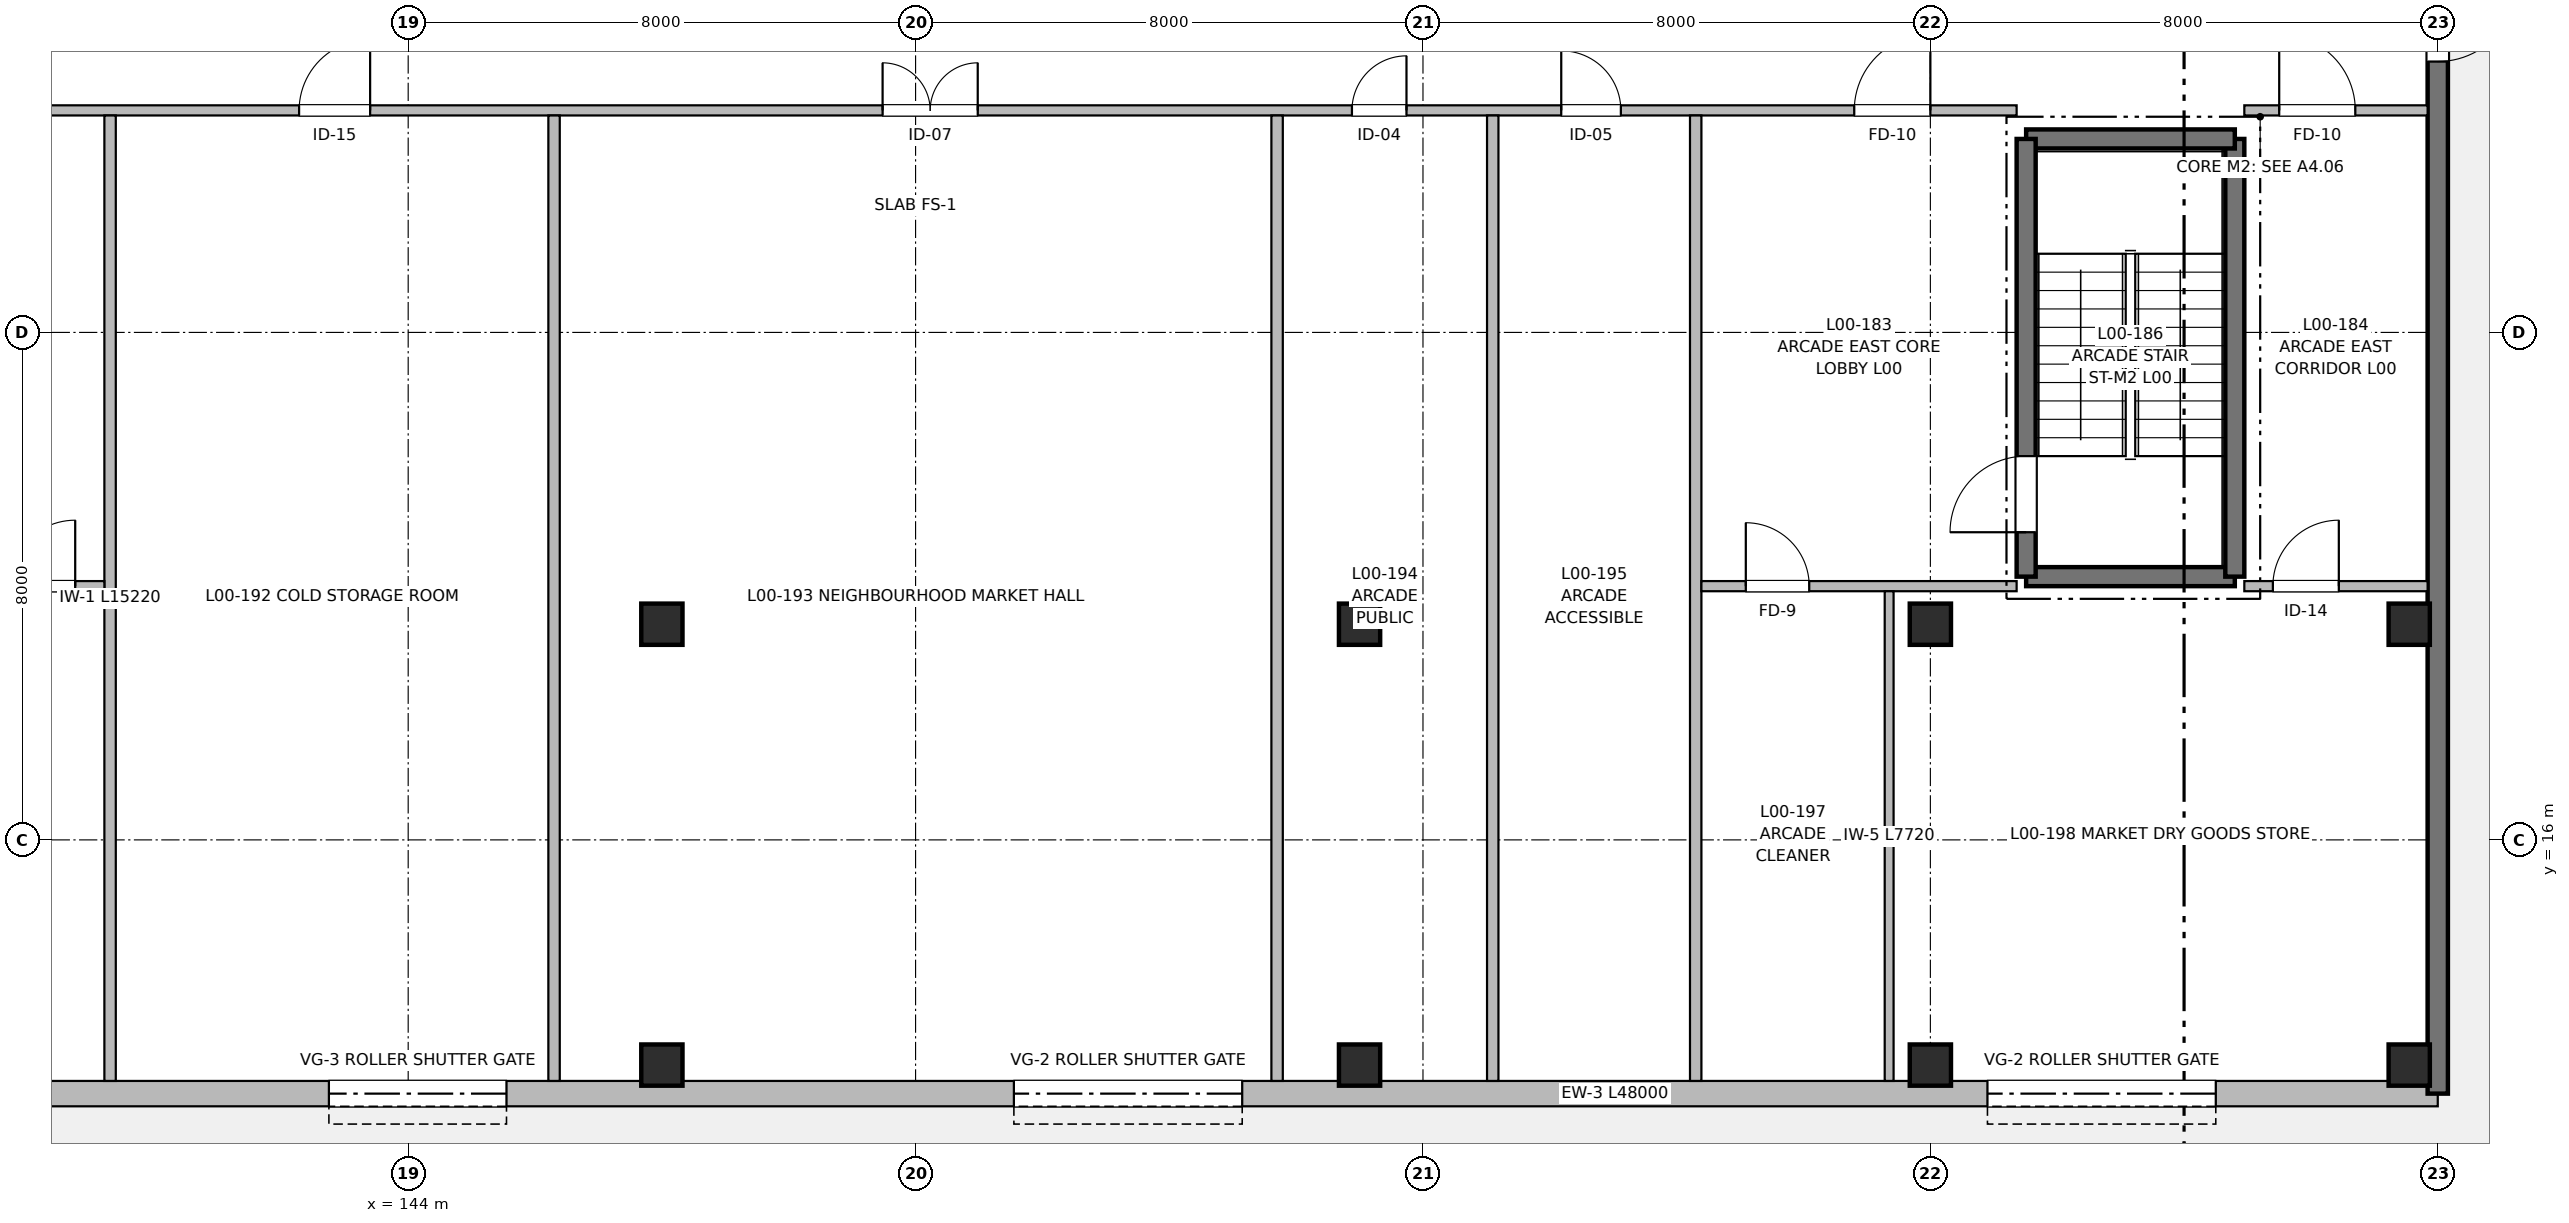
"""IFC4 building model, lengths in metres.
Left out: names, types, materials, properties, quantities, classifications, styles, units other than length and angle.
Written with IfcOpenShell. Run it as: python <this file> out.ifc"""

import sys

from ifc_helpers import new_model, si_unit, direction, frame, frame_2d, origin, origin_2d, place, context, subcontext, project, spatial, rectangle, extrude, element, fill, save


model = new_model("IFC4")
c1 = context("Model", 3, precision=1e-05, world=origin(), true_north=direction((0.0, 1.0)))
c2 = subcontext(c1, "Body", "Model", "MODEL_VIEW")
j1 = project(units=[si_unit("LENGTHUNIT", "METRE"), si_unit("PLANEANGLEUNIT", "RADIAN")], contexts=[c1])
p1 = place(None, origin())
s1 = spatial("IfcSite", under=j1, at=p1, CompositionType="ELEMENT")
p2 = place(p1, origin())
s2 = spatial("IfcBuilding", under=s1, at=p2, CompositionType="ELEMENT")
p3 = place(p2, origin())
s3 = spatial("IfcBuildingStorey", under=s2, at=p3, CompositionType="ELEMENT", Elevation=0.0)
for number, where, z_axis, x_axis in (
    (1, (148.0, 12.45, 0.0), (0.0, 0.0, 1.0), (1.0, 0.0, 0.0)),
    (2, (148.0, 19.4, 0.0), (0.0, 0.0, 1.0), (1.0, 0.0, 0.0)),
    (3, (159.0, 12.45, 0.0), (0.0, 0.0, 1.0), (1.0, 0.0, 0.0)),
    (4, (159.0, 19.4, 0.0), (0.0, 0.0, 1.0), (1.0, 0.0, 0.0)),
    (5, (168.0, 12.45, 0.0), (0.0, 0.0, 1.0), (1.0, 0.0, 0.0)),
    (6, (168.0, 19.4, 0.0), (0.0, 0.0, 1.0), (1.0, 0.0, 0.0)),
    (7, (175.55, 12.45, 0.0), (0.0, 0.0, 1.0), (1.0, 0.0, 0.0)),
    (8, (175.55, 19.4, 0.0), (0.0, 0.0, 1.0), (1.0, 0.0, 0.0)),
):
    element("IfcColumn", number, at=place(p3, frame(where, z_axis=z_axis, x_axis=x_axis)), inside=s3, PredefinedType="COLUMN", context=c2, shape_type="SweptSolid", body=[
        extrude(rectangle(XDim=0.65, YDim=0.65, at=origin_2d()), origin(), (0.0, 0.0, 1.0), 4.16),
    ])
p4 = place(p3, frame((176.0, 12.0, 0.0), z_axis=(0.0, 0.0, 1.0), x_axis=(-1.0, 0.0, 0.0)))
e9 = element("IfcWall", 9, at=p4, inside=s3, PredefinedType="SOLIDWALL", context=c2, shape_type="SweptSolid", body=[
    extrude(rectangle(XDim=48.0, YDim=0.4, at=frame_2d((24.0, 0.0))), origin(), (0.0, 0.0, 1.0), 3.9),
])
p5 = place(p4, frame((3.5, 0.0, 0.0)))
e10 = element("IfcOpeningElement", 10, at=p5, cuts=e9, PredefinedType="OPENING", context=c2, shape_type="SweptSolid", body=[
    extrude(rectangle(XDim=3.6, YDim=2.8, at=frame_2d((1.8, 1.4))), frame((0.0, 0.21, 0.0), z_axis=(0.0, -1.0, 0.0), x_axis=(1.0, 0.0, 0.0)), (0.0, 0.0, 1.0), 0.42),
])
p6 = place(p4, frame((18.85, 0.0, 0.0)))
e11 = element("IfcOpeningElement", 11, at=p6, cuts=e9, PredefinedType="OPENING", context=c2, shape_type="SweptSolid", body=[
    extrude(rectangle(XDim=3.6, YDim=2.8, at=frame_2d((1.8, 1.4))), frame((0.0, 0.21, 0.0), z_axis=(0.0, -1.0, 0.0), x_axis=(1.0, 0.0, 0.0)), (0.0, 0.0, 1.0), 0.42),
])
p7 = place(p4, frame((30.45, 0.0, 0.0)))
e12 = element("IfcOpeningElement", 12, at=p7, cuts=e9, PredefinedType="OPENING", context=c2, shape_type="SweptSolid", body=[
    extrude(rectangle(XDim=2.8, YDim=2.5, at=frame_2d((1.4, 1.25))), frame((0.0, 0.21, 0.0), z_axis=(0.0, -1.0, 0.0), x_axis=(1.0, 0.0, 0.0)), (0.0, 0.0, 1.0), 0.42),
])
p8 = place(p4, frame((39.8, 0.0, 0.0)))
e13 = element("IfcOpeningElement", 13, at=p8, cuts=e9, PredefinedType="OPENING", context=c2, shape_type="SweptSolid", body=[
    extrude(rectangle(XDim=2.8, YDim=2.5, at=frame_2d((1.4, 1.25))), frame((0.0, 0.21, 0.0), z_axis=(0.0, -1.0, 0.0), x_axis=(1.0, 0.0, 0.0)), (0.0, 0.0, 1.0), 0.42),
])
p9 = place(p3, frame((176.0, 40.0, 0.0), z_axis=(0.0, 0.0, 1.0), x_axis=(0.0, -1.0, 0.0)))
e14 = element("IfcWall", 14, at=p9, inside=s3, PredefinedType="SHEAR", context=c2, shape_type="SweptSolid", body=[
    extrude(rectangle(XDim=28.0, YDim=0.32, at=frame_2d((14.0, 0.0))), origin(), (0.0, 0.0, 1.0), 3.9),
])
p10 = place(p9, frame((10.48, 0.0, 0.0)))
e15 = element("IfcOpeningElement", 15, at=p10, cuts=e14, PredefinedType="OPENING", context=c2, shape_type="SweptSolid", body=[
    extrude(rectangle(XDim=1.25, YDim=2.2, at=frame_2d((0.625, 1.1))), frame((0.0, 0.17, 0.0), z_axis=(0.0, -1.0, 0.0), x_axis=(1.0, 0.0, 0.0)), (0.0, 0.0, 1.0), 0.34),
])
p11 = place(p3, frame((172.8, 20.15, 0.0), z_axis=(0.0, 0.0, 1.0), x_axis=(-1.0, 0.0, 0.0)))
e16 = element("IfcWall", 16, at=p11, inside=s3, PredefinedType="SHEAR", context=c2, shape_type="SweptSolid", body=[
    extrude(rectangle(XDim=3.29, YDim=0.3, at=frame_2d((1.645, 0.0))), origin(), (0.0, 0.0, 1.0), 4.16),
])
p12 = place(p3, frame((172.8, 27.05, 0.0), z_axis=(0.0, 0.0, 1.0), x_axis=(0.0, -1.0, 0.0)))
e17 = element("IfcWall", 17, at=p12, inside=s3, PredefinedType="SHEAR", context=c2, shape_type="SweptSolid", body=[
    extrude(rectangle(XDim=6.9, YDim=0.3, at=frame_2d((3.45, 0.0))), origin(), (0.0, 0.0, 1.0), 4.16),
])
p13 = place(p3, frame((169.51, 27.05, 0.0), z_axis=(0.0, 0.0, 1.0), x_axis=(1.0, 0.0, 0.0)))
e18 = element("IfcWall", 18, at=p13, inside=s3, PredefinedType="SHEAR", context=c2, shape_type="SweptSolid", body=[
    extrude(rectangle(XDim=3.29, YDim=0.3, at=frame_2d((1.645, 0.0))), origin(), (0.0, 0.0, 1.0), 4.16),
])
p14 = place(p3, frame((169.51, 20.15, 0.0), z_axis=(0.0, 0.0, 1.0), x_axis=(0.0, 1.0, 0.0)))
e19 = element("IfcWall", 19, at=p14, inside=s3, PredefinedType="SHEAR", context=c2, shape_type="SweptSolid", body=[
    extrude(rectangle(XDim=6.9, YDim=0.3, at=frame_2d((3.45, 0.0))), origin(), (0.0, 0.0, 1.0), 4.16),
])
p15 = place(p14, frame((0.7, 0.0, 0.0)))
e20 = element("IfcOpeningElement", 20, at=p15, cuts=e19, PredefinedType="OPENING", context=c2, shape_type="SweptSolid", body=[
    extrude(rectangle(XDim=1.2, YDim=2.2, at=frame_2d((0.6, 1.1))), frame((0.0, 0.16, 0.0), z_axis=(0.0, -1.0, 0.0), x_axis=(1.0, 0.0, 0.0)), (0.0, 0.0, 1.0), 0.32),
])
p16 = place(p3, frame((133.35, 27.5, 0.0), z_axis=(0.0, 0.0, 1.0), x_axis=(1.0, 0.0, 0.0)))
e21 = element("IfcWall", 21, at=p16, inside=s3, PredefinedType="PARTITIONING", context=c2, shape_type="SweptSolid", body=[
    extrude(rectangle(XDim=36.01, YDim=0.16, at=frame_2d((18.005, 0.0))), origin(), (0.0, 0.0, 1.0), 3.89),
])
p17 = place(p16, frame((2.15, 0.0, 0.0)))
e22 = element("IfcOpeningElement", 22, at=p17, cuts=e21, PredefinedType="OPENING", context=c2, shape_type="SweptSolid", body=[
    extrude(rectangle(XDim=1.2, YDim=2.2, at=frame_2d((0.6, 1.1))), frame((0.0, 0.09, 0.0), z_axis=(0.0, -1.0, 0.0), x_axis=(1.0, 0.0, 0.0)), (0.0, 0.0, 1.0), 0.18),
])
p18 = place(p16, frame((33.45, 0.0, 0.0)))
e23 = element("IfcOpeningElement", 23, at=p18, cuts=e21, PredefinedType="OPENING", context=c2, shape_type="SweptSolid", body=[
    extrude(rectangle(XDim=1.2, YDim=2.2, at=frame_2d((0.6, 1.1))), frame((0.0, 0.09, 0.0), z_axis=(0.0, -1.0, 0.0), x_axis=(1.0, 0.0, 0.0)), (0.0, 0.0, 1.0), 0.18),
])
p19 = place(p16, frame((8.93, 0.0, 0.0)))
e24 = element("IfcOpeningElement", 24, at=p19, cuts=e21, PredefinedType="OPENING", context=c2, shape_type="SweptSolid", body=[
    extrude(rectangle(XDim=1.12, YDim=2.2, at=frame_2d((0.56, 1.1))), frame((0.0, 0.09, 0.0), z_axis=(0.0, -1.0, 0.0), x_axis=(1.0, 0.0, 0.0)), (0.0, 0.0, 1.0), 0.18),
])
p20 = place(p16, frame((18.13, 0.0, 0.0)))
e25 = element("IfcOpeningElement", 25, at=p20, cuts=e21, PredefinedType="OPENING", context=c2, shape_type="SweptSolid", body=[
    extrude(rectangle(XDim=1.5, YDim=2.2, at=frame_2d((0.75, 1.1))), frame((0.0, 0.09, 0.0), z_axis=(0.0, -1.0, 0.0), x_axis=(1.0, 0.0, 0.0)), (0.0, 0.0, 1.0), 0.18),
])
p21 = place(p16, frame((25.53, 0.0, 0.0)))
e26 = element("IfcOpeningElement", 26, at=p21, cuts=e21, PredefinedType="OPENING", context=c2, shape_type="SweptSolid", body=[
    extrude(rectangle(XDim=0.86, YDim=2.1, at=frame_2d((0.43, 1.05))), frame((0.0, 0.09, 0.0), z_axis=(0.0, -1.0, 0.0), x_axis=(1.0, 0.0, 0.0)), (0.0, 0.0, 1.0), 0.18),
])
p22 = place(p16, frame((28.83, 0.0, 0.0)))
e27 = element("IfcOpeningElement", 27, at=p22, cuts=e21, PredefinedType="OPENING", context=c2, shape_type="SweptSolid", body=[
    extrude(rectangle(XDim=0.94, YDim=2.1, at=frame_2d((0.47, 1.05))), frame((0.0, 0.09, 0.0), z_axis=(0.0, -1.0, 0.0), x_axis=(1.0, 0.0, 0.0)), (0.0, 0.0, 1.0), 0.18),
])
p23 = place(p3, frame((172.95, 27.5, 0.0), z_axis=(0.0, 0.0, 1.0), x_axis=(1.0, 0.0, 0.0)))
e28 = element("IfcWall", 28, at=p23, inside=s3, PredefinedType="PARTITIONING", context=c2, shape_type="SweptSolid", body=[
    extrude(rectangle(XDim=2.89, YDim=0.16, at=frame_2d((1.445, 0.0))), origin(), (0.0, 0.0, 1.0), 3.89),
])
p24 = place(p23, frame((0.55, 0.0, 0.0)))
e29 = element("IfcOpeningElement", 29, at=p24, cuts=e28, PredefinedType="OPENING", context=c2, shape_type="SweptSolid", body=[
    extrude(rectangle(XDim=1.2, YDim=2.2, at=frame_2d((0.6, 1.1))), frame((0.0, 0.09, 0.0), z_axis=(0.0, -1.0, 0.0), x_axis=(1.0, 0.0, 0.0)), (0.0, 0.0, 1.0), 0.18),
])
for number, where, z_axis, x_axis in (
    (30, (139.3, 12.2, 0.0), (0.0, 0.0, 1.0), (0.0, 1.0, 0.0)),
    (31, (164.3, 12.2, 0.0), (0.0, 0.0, 1.0), (0.0, 1.0, 0.0)),
    (32, (146.3, 12.2, 0.0), (0.0, 0.0, 1.0), (0.0, 1.0, 0.0)),
    (33, (157.7, 12.2, 0.0), (0.0, 0.0, 1.0), (0.0, 1.0, 0.0)),
    (34, (161.1, 12.2, 0.0), (0.0, 0.0, 1.0), (0.0, 1.0, 0.0)),
):
    element("IfcWall", number, at=place(p3, frame(where, z_axis=z_axis, x_axis=x_axis)), inside=s3, PredefinedType="PARTITIONING", context=c2, shape_type="SweptSolid", body=[
        extrude(rectangle(XDim=15.22, YDim=0.18, at=frame_2d((7.61, 0.0))), origin(), (0.0, 0.0, 1.0), 3.89),
    ])
p25 = place(p3, frame((133.35, 20.0, 0.0), z_axis=(0.0, 0.0, 1.0), x_axis=(1.0, 0.0, 0.0)))
e35 = element("IfcWall", 35, at=p25, inside=s3, PredefinedType="PARTITIONING", context=c2, shape_type="SweptSolid", body=[
    extrude(rectangle(XDim=5.86, YDim=0.16, at=frame_2d((2.93, 0.0))), origin(), (0.0, 0.0, 1.0), 3.89),
])
p26 = place(p25, frame((4.36, 0.0, 0.0)))
e36 = element("IfcOpeningElement", 36, at=p26, cuts=e35, PredefinedType="OPENING", context=c2, shape_type="SweptSolid", body=[
    extrude(rectangle(XDim=1.04, YDim=2.15, at=frame_2d((0.52, 1.075))), frame((0.0, 0.09, 0.0), z_axis=(0.0, -1.0, 0.0), x_axis=(1.0, 0.0, 0.0)), (0.0, 0.0, 1.0), 0.18),
])
p27 = place(p3, frame((164.39, 20.0, 0.0), z_axis=(0.0, 0.0, 1.0), x_axis=(1.0, 0.0, 0.0)))
e37 = element("IfcWall", 37, at=p27, inside=s3, PredefinedType="PARTITIONING", context=c2, shape_type="SweptSolid", body=[
    extrude(rectangle(XDim=4.97, YDim=0.16, at=frame_2d((2.485, 0.0))), origin(), (0.0, 0.0, 1.0), 3.89),
])
p28 = place(p27, frame((0.7, 0.0, 0.0)))
e38 = element("IfcOpeningElement", 38, at=p28, cuts=e37, PredefinedType="OPENING", context=c2, shape_type="SweptSolid", body=[
    extrude(rectangle(XDim=1.0, YDim=2.1, at=frame_2d((0.5, 1.05))), frame((0.0, 0.09, 0.0), z_axis=(0.0, -1.0, 0.0), x_axis=(1.0, 0.0, 0.0)), (0.0, 0.0, 1.0), 0.18),
])
p29 = place(p3, frame((172.95, 20.0, 0.0), z_axis=(0.0, 0.0, 1.0), x_axis=(1.0, 0.0, 0.0)))
e39 = element("IfcWall", 39, at=p29, inside=s3, PredefinedType="PARTITIONING", context=c2, shape_type="SweptSolid", body=[
    extrude(rectangle(XDim=2.89, YDim=0.16, at=frame_2d((1.445, 0.0))), origin(), (0.0, 0.0, 1.0), 3.89),
])
p30 = place(p29, frame((0.45, 0.0, 0.0)))
e40 = element("IfcOpeningElement", 40, at=p30, cuts=e39, PredefinedType="OPENING", context=c2, shape_type="SweptSolid", body=[
    extrude(rectangle(XDim=1.04, YDim=2.15, at=frame_2d((0.52, 1.075))), frame((0.0, 0.09, 0.0), z_axis=(0.0, -1.0, 0.0), x_axis=(1.0, 0.0, 0.0)), (0.0, 0.0, 1.0), 0.18),
])
p31 = place(p3, frame((167.35, 12.2, 0.0), z_axis=(0.0, 0.0, 1.0), x_axis=(0.0, 1.0, 0.0)))
e41 = element("IfcWall", 41, at=p31, inside=s3, PredefinedType="PARTITIONING", context=c2, shape_type="SweptSolid", body=[
    extrude(rectangle(XDim=7.72, YDim=0.14, at=frame_2d((3.86, 0.0))), origin(), (0.0, 0.0, 1.0), 3.89),
])
p32 = place(p10, origin())
e42 = element("IfcDoor", 42, at=p32, inside=s3, OperationType="SINGLE_SWING_LEFT", PredefinedType="DOOR", context=c2, shape_type="SweptSolid", body=[
    extrude(rectangle(XDim=1.25, YDim=2.2, at=frame_2d((0.625, 1.1))), frame((0.0, 0.025, 0.0), z_axis=(0.0, -1.0, 0.0), x_axis=(1.0, 0.0, 0.0)), (0.0, 0.0, 1.0), 0.05),
])
fill(e15, e42)
p33 = place(p5, origin())
e43 = element("IfcDoor", 43, at=p33, inside=s3, OperationType="ROLLINGUP", PredefinedType="GATE", context=c2, shape_type="SweptSolid", body=[
    extrude(rectangle(XDim=3.6, YDim=2.8, at=frame_2d((1.8, 1.4))), frame((0.0, 0.025, 0.0), z_axis=(0.0, -1.0, 0.0), x_axis=(1.0, 0.0, 0.0)), (0.0, 0.0, 1.0), 0.05),
])
fill(e10, e43)
p34 = place(p6, origin())
e44 = element("IfcDoor", 44, at=p34, inside=s3, OperationType="ROLLINGUP", PredefinedType="GATE", context=c2, shape_type="SweptSolid", body=[
    extrude(rectangle(XDim=3.6, YDim=2.8, at=frame_2d((1.8, 1.4))), frame((0.0, 0.025, 0.0), z_axis=(0.0, -1.0, 0.0), x_axis=(1.0, 0.0, 0.0)), (0.0, 0.0, 1.0), 0.05),
])
fill(e11, e44)
p35 = place(p7, origin())
e45 = element("IfcDoor", 45, at=p35, inside=s3, OperationType="ROLLINGUP", PredefinedType="GATE", context=c2, shape_type="SweptSolid", body=[
    extrude(rectangle(XDim=2.8, YDim=2.5, at=frame_2d((1.4, 1.25))), frame((0.0, 0.025, 0.0), z_axis=(0.0, -1.0, 0.0), x_axis=(1.0, 0.0, 0.0)), (0.0, 0.0, 1.0), 0.05),
])
fill(e12, e45)
p36 = place(p15, origin())
e46 = element("IfcDoor", 46, at=p36, inside=s3, OperationType="SINGLE_SWING_LEFT", PredefinedType="DOOR", context=c2, shape_type="SweptSolid", body=[
    extrude(rectangle(XDim=1.2, YDim=2.2, at=frame_2d((0.6, 1.1))), frame((0.0, 0.025, 0.0), z_axis=(0.0, -1.0, 0.0), x_axis=(1.0, 0.0, 0.0)), (0.0, 0.0, 1.0), 0.05),
])
fill(e20, e46)
p37 = place(p18, origin())
e47 = element("IfcDoor", 47, at=p37, inside=s3, OperationType="SINGLE_SWING_RIGHT", PredefinedType="DOOR", context=c2, shape_type="SweptSolid", body=[
    extrude(rectangle(XDim=1.2, YDim=2.2, at=frame_2d((0.6, 1.1))), frame((0.0, 0.025, 0.0), z_axis=(0.0, -1.0, 0.0), x_axis=(1.0, 0.0, 0.0)), (0.0, 0.0, 1.0), 0.05),
])
fill(e23, e47)
p38 = place(p24, origin())
e48 = element("IfcDoor", 48, at=p38, inside=s3, OperationType="SINGLE_SWING_LEFT", PredefinedType="DOOR", context=c2, shape_type="SweptSolid", body=[
    extrude(rectangle(XDim=1.2, YDim=2.2, at=frame_2d((0.6, 1.1))), frame((0.0, 0.025, 0.0), z_axis=(0.0, -1.0, 0.0), x_axis=(1.0, 0.0, 0.0)), (0.0, 0.0, 1.0), 0.05),
])
fill(e29, e48)
p39 = place(p19, origin())
e49 = element("IfcDoor", 49, at=p39, inside=s3, OperationType="SINGLE_SWING_RIGHT", PredefinedType="DOOR", context=c2, shape_type="SweptSolid", body=[
    extrude(rectangle(XDim=1.12, YDim=2.2, at=frame_2d((0.56, 1.1))), frame((0.0, 0.025, 0.0), z_axis=(0.0, -1.0, 0.0), x_axis=(1.0, 0.0, 0.0)), (0.0, 0.0, 1.0), 0.05),
])
fill(e24, e49)
p40 = place(p20, origin())
e50 = element("IfcDoor", 50, at=p40, inside=s3, OperationType="DOUBLE_DOOR_SINGLE_SWING", PredefinedType="DOOR", context=c2, shape_type="SweptSolid", body=[
    extrude(rectangle(XDim=1.5, YDim=2.2, at=frame_2d((0.75, 1.1))), frame((0.0, 0.025, 0.0), z_axis=(0.0, -1.0, 0.0), x_axis=(1.0, 0.0, 0.0)), (0.0, 0.0, 1.0), 0.05),
])
fill(e25, e50)
p41 = place(p21, origin())
e51 = element("IfcDoor", 51, at=p41, inside=s3, OperationType="SINGLE_SWING_RIGHT", PredefinedType="DOOR", context=c2, shape_type="SweptSolid", body=[
    extrude(rectangle(XDim=0.86, YDim=2.1, at=frame_2d((0.43, 1.05))), frame((0.0, 0.025, 0.0), z_axis=(0.0, -1.0, 0.0), x_axis=(1.0, 0.0, 0.0)), (0.0, 0.0, 1.0), 0.05),
])
fill(e26, e51)
p42 = place(p22, origin())
e52 = element("IfcDoor", 52, at=p42, inside=s3, OperationType="SINGLE_SWING_LEFT", PredefinedType="DOOR", context=c2, shape_type="SweptSolid", body=[
    extrude(rectangle(XDim=0.94, YDim=2.1, at=frame_2d((0.47, 1.05))), frame((0.0, 0.025, 0.0), z_axis=(0.0, -1.0, 0.0), x_axis=(1.0, 0.0, 0.0)), (0.0, 0.0, 1.0), 0.05),
])
fill(e27, e52)
p43 = place(p26, origin())
e53 = element("IfcDoor", 53, at=p43, inside=s3, OperationType="SINGLE_SWING_RIGHT", PredefinedType="DOOR", context=c2, shape_type="SweptSolid", body=[
    extrude(rectangle(XDim=1.04, YDim=2.15, at=frame_2d((0.52, 1.075))), frame((0.0, 0.025, 0.0), z_axis=(0.0, -1.0, 0.0), x_axis=(1.0, 0.0, 0.0)), (0.0, 0.0, 1.0), 0.05),
])
fill(e36, e53)
p44 = place(p28, origin())
e54 = element("IfcDoor", 54, at=p44, inside=s3, OperationType="SINGLE_SWING_LEFT", PredefinedType="DOOR", context=c2, shape_type="SweptSolid", body=[
    extrude(rectangle(XDim=1.0, YDim=2.1, at=frame_2d((0.5, 1.05))), frame((0.0, 0.025, 0.0), z_axis=(0.0, -1.0, 0.0), x_axis=(1.0, 0.0, 0.0)), (0.0, 0.0, 1.0), 0.05),
])
fill(e38, e54)
p45 = place(p30, origin())
e55 = element("IfcDoor", 55, at=p45, inside=s3, OperationType="SINGLE_SWING_RIGHT", PredefinedType="DOOR", context=c2, shape_type="SweptSolid", body=[
    extrude(rectangle(XDim=1.04, YDim=2.15, at=frame_2d((0.52, 1.075))), frame((0.0, 0.025, 0.0), z_axis=(0.0, -1.0, 0.0), x_axis=(1.0, 0.0, 0.0)), (0.0, 0.0, 1.0), 0.05),
])
fill(e40, e55)
save(model, sys.argv[1])
